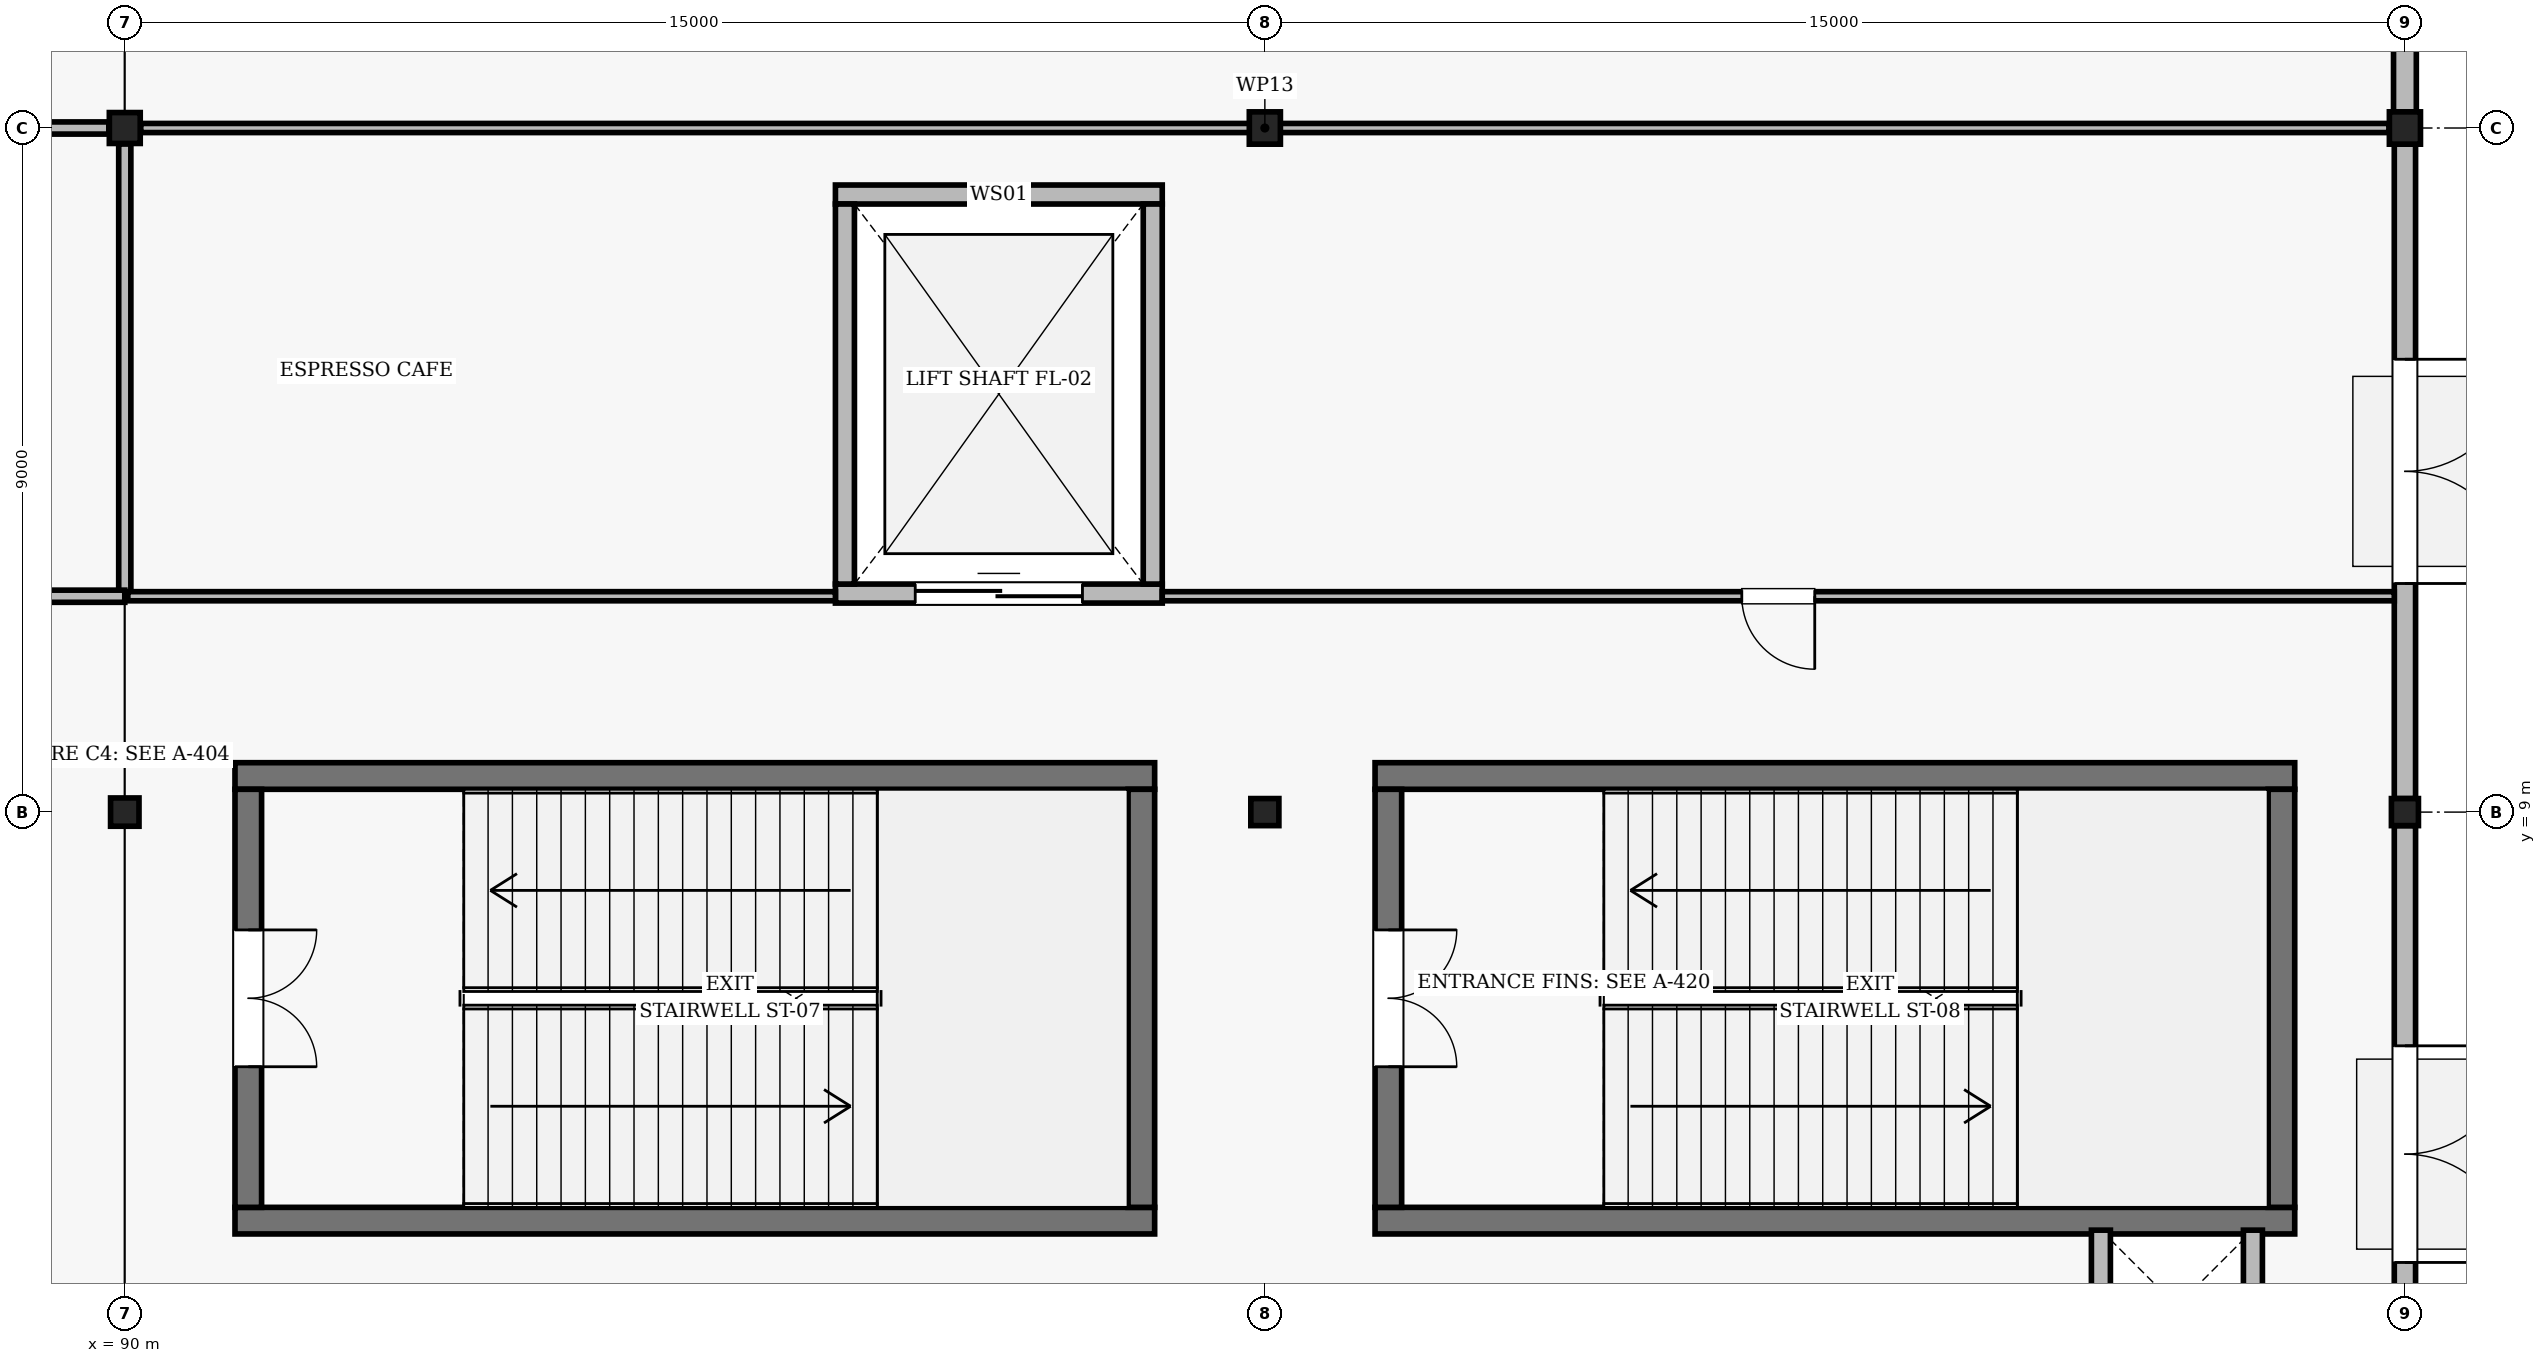
"""IFC4 building model, lengths in metres.
Left out: names, types, materials, properties, quantities, classifications, styles, units other than length and angle.
Written with IfcOpenShell. Run it as: python <this file> out.ifc"""

import sys

from ifc_helpers import new_model, si_unit, direction, frame, frame_2d, origin, origin_2d, place, context, subcontext, project, spatial, rectangle, hollow_circle, i_section, extrude, element, fill, save


model = new_model("IFC4")
c1 = context("Model", 3, precision=1e-05, world=origin(), true_north=direction((0.0, 1.0)))
c2 = subcontext(c1, "Body", "Model", "MODEL_VIEW")
j1 = project(units=[si_unit("LENGTHUNIT", "METRE"), si_unit("PLANEANGLEUNIT", "RADIAN")], contexts=[c1])
p1 = place(None, origin())
s1 = spatial("IfcSite", under=j1, at=p1, CompositionType="ELEMENT")
p2 = place(p1, origin())
s2 = spatial("IfcBuilding", under=s1, at=p2, CompositionType="ELEMENT")
p3 = place(p2, origin())
s3 = spatial("IfcBuildingStorey", under=s2, at=p3, CompositionType="ELEMENT", Elevation=0.0)
p4 = place(p3, frame((90.0, 9.0, 0.0), z_axis=(0.0, 0.0, 1.0), x_axis=(1.0, 0.0, 0.0)))
e1 = element("IfcColumn", 1, at=p4, inside=s3, PredefinedType="COLUMN", context=c2, shape_type="SweptSolid", body=[
    extrude(i_section(OverallWidth=0.374, OverallDepth=0.372, WebThickness=0.016, FlangeThickness=0.026, FilletRadius=0.016, at=origin_2d()), origin(), (0.0, 0.0, 1.0), 5.4),
])
p5 = place(p3, frame((90.0, 18.0, 0.0), z_axis=(0.0, 0.0, 1.0), x_axis=(1.0, 0.0, 0.0)))
e2 = element("IfcColumn", 2, at=p5, inside=s3, PredefinedType="COLUMN", context=c2, shape_type="SweptSolid", body=[
    extrude(hollow_circle(Radius=0.203, WallThickness=0.016, at=origin_2d()), origin(), (0.0, 0.0, 1.0), 5.4),
])
p6 = place(p3, frame((105.0, 9.0, 0.0), z_axis=(0.0, 0.0, 1.0), x_axis=(1.0, 0.0, 0.0)))
e3 = element("IfcColumn", 3, at=p6, inside=s3, PredefinedType="COLUMN", context=c2, shape_type="SweptSolid", body=[
    extrude(i_section(OverallWidth=0.369, OverallDepth=0.356, WebThickness=0.011, FlangeThickness=0.018, FilletRadius=0.015, at=origin_2d()), origin(), (0.0, 0.0, 1.0), 5.4),
])
p7 = place(p3, frame((105.0, 18.0, 0.0), z_axis=(0.0, 0.0, 1.0), x_axis=(1.0, 0.0, 0.0)))
e4 = element("IfcColumn", 4, at=p7, inside=s3, PredefinedType="COLUMN", context=c2, shape_type="SweptSolid", body=[
    extrude(i_section(OverallWidth=0.409, OverallDepth=0.425, WebThickness=0.031, FlangeThickness=0.049, FilletRadius=0.02, at=origin_2d()), origin(), (0.0, 0.0, 1.0), 5.4),
])
p8 = place(p3, frame((120.0, 9.0, 0.0), z_axis=(0.0, 0.0, 1.0), x_axis=(1.0, 0.0, 0.0)))
e5 = element("IfcColumn", 5, at=p8, inside=s3, PredefinedType="COLUMN", context=c2, shape_type="SweptSolid", body=[
    extrude(hollow_circle(Radius=0.178, WallThickness=0.016, at=origin_2d()), origin(), (0.0, 0.0, 1.0), 5.4),
])
p9 = place(p3, frame((120.0, 18.0, 0.0), z_axis=(0.0, 0.0, 1.0), x_axis=(1.0, 0.0, 0.0)))
e6 = element("IfcColumn", 6, at=p9, inside=s3, PredefinedType="COLUMN", context=c2, shape_type="SweptSolid", body=[
    extrude(i_section(OverallWidth=0.409, OverallDepth=0.425, WebThickness=0.031, FlangeThickness=0.049, FilletRadius=0.02, at=origin_2d()), origin(), (0.0, 0.0, 1.0), 5.4),
])
p10 = place(p3, frame((120.0, 8.822, 0.0), z_axis=(0.0, 0.0, 1.0), x_axis=(0.0, -1.0, 0.0)))
e7 = element("IfcWall", 7, at=p10, inside=s3, PredefinedType="SOLIDWALL", context=c2, shape_type="SweptSolid", body=[
    extrude(rectangle(XDim=8.644, YDim=0.28, at=frame_2d((4.322, 0.0))), origin(), (0.0, 0.0, 1.0), 4.699),
])
p11 = place(p10, frame((2.897, 0.0, 0.0)))
e8 = element("IfcOpeningElement", 8, at=p11, cuts=e7, PredefinedType="OPENING", context=c2, shape_type="SweptSolid", body=[
    extrude(rectangle(XDim=2.85, YDim=2.62, at=frame_2d((1.425, 1.31))), frame((0.0, 0.15, 0.0), z_axis=(0.0, -1.0, 0.0), x_axis=(1.0, 0.0, 0.0)), (0.0, 0.0, 1.0), 0.3),
])
p12 = place(p3, frame((120.0, 17.788, 0.0), z_axis=(0.0, 0.0, 1.0), x_axis=(0.0, -1.0, 0.0)))
e9 = element("IfcWall", 9, at=p12, inside=s3, PredefinedType="SOLIDWALL", context=c2, shape_type="SweptSolid", body=[
    extrude(rectangle(XDim=8.61, YDim=0.28, at=frame_2d((4.305, 0.0))), origin(), (0.0, 0.0, 1.0), 4.865),
])
p13 = place(p12, frame((2.83, 0.0, 0.0)))
e10 = element("IfcOpeningElement", 10, at=p13, cuts=e9, PredefinedType="OPENING", context=c2, shape_type="SweptSolid", body=[
    extrude(rectangle(XDim=2.95, YDim=2.68, at=frame_2d((1.475, 1.34))), frame((0.0, 0.15, 0.0), z_axis=(0.0, -1.0, 0.0), x_axis=(1.0, 0.0, 0.0)), (0.0, 0.0, 1.0), 0.3),
])
p14 = place(p3, frame((120.0, 26.525, 0.0), z_axis=(0.0, 0.0, 1.0), x_axis=(0.0, -1.0, 0.0)))
e11 = element("IfcWall", 11, at=p14, inside=s3, PredefinedType="SOLIDWALL", context=c2, shape_type="SweptSolid", body=[
    extrude(rectangle(XDim=8.312, YDim=0.3, at=frame_2d((4.156, 0.0))), origin(), (0.0, 0.0, 1.0), 4.846),
])
for number, where, z_axis, x_axis in (
    (12, (91.45, 3.625, 0.0), (0.0, 0.0, 1.0), (1.0, 0.0, 0.0)),
    (13, (103.55, 9.475, 0.0), (0.0, 0.0, 1.0), (-1.0, 0.0, 0.0)),
):
    element("IfcWall", number, at=place(p3, frame(where, z_axis=z_axis, x_axis=x_axis)), inside=s3, PredefinedType="SHEAR", context=c2, shape_type="SweptSolid", body=[
        extrude(rectangle(XDim=12.1, YDim=0.35, at=frame_2d((6.05, 0.0))), origin(), (0.0, 0.0, 1.0), 5.18),
    ])
p15 = place(p3, frame((91.625, 9.3, 0.0), z_axis=(0.0, 0.0, 1.0), x_axis=(0.0, -1.0, 0.0)))
e14 = element("IfcWall", 14, at=p15, inside=s3, PredefinedType="SHEAR", context=c2, shape_type="SweptSolid", body=[
    extrude(rectangle(XDim=5.5, YDim=0.35, at=frame_2d((2.75, 0.0))), origin(), (0.0, 0.0, 1.0), 5.18),
])
p16 = place(p15, frame((1.85, 0.0, 0.0)))
e15 = element("IfcOpeningElement", 15, at=p16, cuts=e14, PredefinedType="OPENING", context=c2, shape_type="SweptSolid", body=[
    extrude(rectangle(XDim=1.8, YDim=2.2, at=frame_2d((0.9, 1.1))), frame((0.0, 0.185, 0.0), z_axis=(0.0, -1.0, 0.0), x_axis=(1.0, 0.0, 0.0)), (0.0, 0.0, 1.0), 0.37),
])
p17 = place(p3, frame((103.375, 3.8, 0.0), z_axis=(0.0, 0.0, 1.0), x_axis=(0.0, 1.0, 0.0)))
e16 = element("IfcWall", 16, at=p17, inside=s3, PredefinedType="SHEAR", context=c2, shape_type="SweptSolid", body=[
    extrude(rectangle(XDim=5.5, YDim=0.35, at=frame_2d((2.75, 0.0))), origin(), (0.0, 0.0, 1.0), 5.18),
])
for number, where, z_axis, x_axis in (
    (17, (106.45, 3.625, 0.0), (0.0, 0.0, 1.0), (1.0, 0.0, 0.0)),
    (18, (118.55, 9.475, 0.0), (0.0, 0.0, 1.0), (-1.0, 0.0, 0.0)),
):
    element("IfcWall", number, at=place(p3, frame(where, z_axis=z_axis, x_axis=x_axis)), inside=s3, PredefinedType="SHEAR", context=c2, shape_type="SweptSolid", body=[
        extrude(rectangle(XDim=12.1, YDim=0.35, at=frame_2d((6.05, 0.0))), origin(), (0.0, 0.0, 1.0), 5.18),
    ])
p18 = place(p3, frame((106.625, 9.3, 0.0), z_axis=(0.0, 0.0, 1.0), x_axis=(0.0, -1.0, 0.0)))
e19 = element("IfcWall", 19, at=p18, inside=s3, PredefinedType="SHEAR", context=c2, shape_type="SweptSolid", body=[
    extrude(rectangle(XDim=5.5, YDim=0.35, at=frame_2d((2.75, 0.0))), origin(), (0.0, 0.0, 1.0), 5.18),
])
p19 = place(p18, frame((1.85, 0.0, 0.0)))
e20 = element("IfcOpeningElement", 20, at=p19, cuts=e19, PredefinedType="OPENING", context=c2, shape_type="SweptSolid", body=[
    extrude(rectangle(XDim=1.8, YDim=2.2, at=frame_2d((0.9, 1.1))), frame((0.0, 0.185, 0.0), z_axis=(0.0, -1.0, 0.0), x_axis=(1.0, 0.0, 0.0)), (0.0, 0.0, 1.0), 0.37),
])
p20 = place(p3, frame((118.375, 3.8, 0.0), z_axis=(0.0, 0.0, 1.0), x_axis=(0.0, 1.0, 0.0)))
e21 = element("IfcWall", 21, at=p20, inside=s3, PredefinedType="SHEAR", context=c2, shape_type="SweptSolid", body=[
    extrude(rectangle(XDim=5.5, YDim=0.35, at=frame_2d((2.75, 0.0))), origin(), (0.0, 0.0, 1.0), 5.18),
])
p21 = place(p3, frame((99.35, 11.875, 0.0), z_axis=(0.0, 0.0, 1.0), x_axis=(1.0, 0.0, 0.0)))
e22 = element("IfcWall", 22, at=p21, inside=s3, PredefinedType="SOLIDWALL", context=c2, shape_type="SweptSolid", body=[
    extrude(rectangle(XDim=4.3, YDim=0.25, at=frame_2d((2.15, 0.0))), origin(), (0.0, 0.0, 1.0), 5.18),
])
p22 = place(p21, frame((1.05, 0.0, 0.0)))
e23 = element("IfcOpeningElement", 23, at=p22, cuts=e22, PredefinedType="OPENING", context=c2, shape_type="SweptSolid", body=[
    extrude(rectangle(XDim=2.2, YDim=2.5, at=frame_2d((1.1, 1.25))), frame((0.0, 0.135, 0.0), z_axis=(0.0, -1.0, 0.0), x_axis=(1.0, 0.0, 0.0)), (0.0, 0.0, 1.0), 0.27),
])
p23 = place(p3, frame((103.65, 17.125, 0.0), z_axis=(0.0, 0.0, 1.0), x_axis=(-1.0, 0.0, 0.0)))
e24 = element("IfcWall", 24, at=p23, inside=s3, PredefinedType="SOLIDWALL", context=c2, shape_type="SweptSolid", body=[
    extrude(rectangle(XDim=4.3, YDim=0.25, at=frame_2d((2.15, 0.0))), origin(), (0.0, 0.0, 1.0), 5.18),
])
for number, where, z_axis, x_axis in (
    (25, (99.475, 17.0, 0.0), (0.0, 0.0, 1.0), (0.0, -1.0, 0.0)),
    (26, (103.525, 12.0, 0.0), (0.0, 0.0, 1.0), (0.0, 1.0, 0.0)),
):
    element("IfcWall", number, at=place(p3, frame(where, z_axis=z_axis, x_axis=x_axis)), inside=s3, PredefinedType="SOLIDWALL", context=c2, shape_type="SweptSolid", body=[
        extrude(rectangle(XDim=5.0, YDim=0.25, at=frame_2d((2.5, 0.0))), origin(), (0.0, 0.0, 1.0), 5.18),
    ])
p24 = place(p3, frame((60.48, 18.0, 0.0), z_axis=(0.0, 0.0, 1.0), x_axis=(1.0, 0.0, 0.0)))
e27 = element("IfcWall", 27, at=p24, inside=s3, PredefinedType="PARTITIONING", context=c2, shape_type="SweptSolid", body=[
    extrude(rectangle(XDim=29.31, YDim=0.16, at=frame_2d((14.655, 0.0))), origin(), (0.0, 0.0, 1.0), 4.481),
])
p25 = place(p3, frame((90.0, 17.79, 0.0), z_axis=(0.0, 0.0, 1.0), x_axis=(0.0, -1.0, 0.0)))
e28 = element("IfcWall", 28, at=p25, inside=s3, PredefinedType="PARTITIONING", context=c2, shape_type="SweptSolid", body=[
    extrude(rectangle(XDim=5.95, YDim=0.16, at=frame_2d((2.975, 0.0))), origin(), (0.0, 0.0, 1.0), 4.554),
])
p26 = place(p3, frame((90.0, 11.84, 0.0), z_axis=(0.0, 0.0, 1.0), x_axis=(-1.0, 0.0, 0.0)))
e29 = element("IfcWall", 29, at=p26, inside=s3, PredefinedType="PARTITIONING", context=c2, shape_type="SweptSolid", body=[
    extrude(rectangle(XDim=16.38, YDim=0.16, at=frame_2d((8.19, 0.0))), origin(), (0.0, 0.0, 1.0), 4.481),
])
p27 = place(p26, frame((7.065, 0.0, 0.0)))
e30 = element("IfcOpeningElement", 30, at=p27, cuts=e29, PredefinedType="OPENING", context=c2, shape_type="SweptSolid", body=[
    extrude(rectangle(XDim=2.25, YDim=2.4, at=frame_2d((1.125, 1.2))), frame((0.0, 0.09, 0.0), z_axis=(0.0, -1.0, 0.0), x_axis=(1.0, 0.0, 0.0)), (0.0, 0.0, 1.0), 0.18),
])
p28 = place(p3, frame((119.86, 11.84, 0.0), z_axis=(0.0, 0.0, 1.0), x_axis=(-1.0, 0.0, 0.0)))
e31 = element("IfcWall", 31, at=p28, inside=s3, PredefinedType="PARTITIONING", context=c2, shape_type="SweptSolid", body=[
    extrude(rectangle(XDim=16.21, YDim=0.12, at=frame_2d((8.105, 0.0))), origin(), (0.0, 0.0, 1.0), 4.392),
])
p29 = place(p28, frame((7.625, 0.0, 0.0)))
e32 = element("IfcOpeningElement", 32, at=p29, cuts=e31, PredefinedType="OPENING", context=c2, shape_type="SweptSolid", body=[
    extrude(rectangle(XDim=0.96, YDim=2.15, at=frame_2d((0.48, 1.075))), frame((0.0, 0.07, 0.0), z_axis=(0.0, -1.0, 0.0), x_axis=(1.0, 0.0, 0.0)), (0.0, 0.0, 1.0), 0.14),
])
p30 = place(p3, frame((99.35, 11.84, 0.0), z_axis=(0.0, 0.0, 1.0), x_axis=(-1.0, 0.0, 0.0)))
e33 = element("IfcWall", 33, at=p30, inside=s3, PredefinedType="PARTITIONING", context=c2, shape_type="SweptSolid", body=[
    extrude(rectangle(XDim=9.31, YDim=0.12, at=frame_2d((4.655, 0.0))), origin(), (0.0, 0.0, 1.0), 4.554),
])
p31 = place(p3, frame((90.21, 18.0, 0.0), z_axis=(0.0, 0.0, 1.0), x_axis=(1.0, 0.0, 0.0)))
e34 = element("IfcWall", 34, at=p31, inside=s3, PredefinedType="PARTITIONING", context=c2, shape_type="SweptSolid", body=[
    extrude(rectangle(XDim=29.58, YDim=0.12, at=frame_2d((14.79, 0.0))), origin(), (0.0, 0.0, 1.0), 4.392),
])
for number, where, z_axis, x_axis in (
    (35, (116.0, 3.5, 0.0), (0.0, 0.0, 1.0), (0.0, -1.0, 0.0)),
    (36, (118.0, 1.5, 0.0), (0.0, 0.0, 1.0), (0.0, 1.0, 0.0)),
):
    element("IfcWall", number, at=place(p3, frame(where, z_axis=z_axis, x_axis=x_axis)), inside=s3, PredefinedType="SOLIDWALL", context=c2, shape_type="SweptSolid", body=[
        extrude(rectangle(XDim=2.0, YDim=0.25, at=frame_2d((1.0, 0.0))), origin(), (0.0, 0.0, 1.0), 4.83),
    ])
p32 = place(p11, origin())
e37 = element("IfcDoor", 37, at=p32, inside=s3, OperationType="DOUBLE_DOOR_SINGLE_SWING", PredefinedType="DOOR", context=c2, shape_type="SweptSolid", body=[
    extrude(rectangle(XDim=2.85, YDim=2.62, at=frame_2d((1.425, 1.31))), frame((0.0, 0.025, 0.0), z_axis=(0.0, -1.0, 0.0), x_axis=(1.0, 0.0, 0.0)), (0.0, 0.0, 1.0), 0.05),
])
fill(e8, e37)
p33 = place(p13, origin())
e38 = element("IfcDoor", 38, at=p33, inside=s3, OperationType="DOUBLE_DOOR_SINGLE_SWING", PredefinedType="DOOR", context=c2, shape_type="SweptSolid", body=[
    extrude(rectangle(XDim=2.95, YDim=2.68, at=frame_2d((1.475, 1.34))), frame((0.0, 0.025, 0.0), z_axis=(0.0, -1.0, 0.0), x_axis=(1.0, 0.0, 0.0)), (0.0, 0.0, 1.0), 0.05),
])
fill(e10, e38)
p34 = place(p16, origin())
e39 = element("IfcDoor", 39, at=p34, inside=s3, OperationType="DOUBLE_DOOR_SINGLE_SWING", PredefinedType="DOOR", context=c2, shape_type="SweptSolid", body=[
    extrude(rectangle(XDim=1.8, YDim=2.2, at=frame_2d((0.9, 1.1))), frame((0.0, 0.025, 0.0), z_axis=(0.0, -1.0, 0.0), x_axis=(1.0, 0.0, 0.0)), (0.0, 0.0, 1.0), 0.05),
])
fill(e15, e39)
p35 = place(p19, origin())
e40 = element("IfcDoor", 40, at=p35, inside=s3, OperationType="DOUBLE_DOOR_SINGLE_SWING", PredefinedType="DOOR", context=c2, shape_type="SweptSolid", body=[
    extrude(rectangle(XDim=1.8, YDim=2.2, at=frame_2d((0.9, 1.1))), frame((0.0, 0.025, 0.0), z_axis=(0.0, -1.0, 0.0), x_axis=(1.0, 0.0, 0.0)), (0.0, 0.0, 1.0), 0.05),
])
fill(e20, e40)
p36 = place(p22, origin())
e41 = element("IfcDoor", 41, at=p36, inside=s3, OperationType="DOUBLE_DOOR_SLIDING", PredefinedType="DOOR", context=c2, shape_type="SweptSolid", body=[
    extrude(rectangle(XDim=2.2, YDim=2.5, at=frame_2d((1.1, 1.25))), frame((0.0, 0.025, 0.0), z_axis=(0.0, -1.0, 0.0), x_axis=(1.0, 0.0, 0.0)), (0.0, 0.0, 1.0), 0.05),
])
fill(e23, e41)
p37 = place(p29, origin())
e42 = element("IfcDoor", 42, at=p37, inside=s3, OperationType="SINGLE_SWING_LEFT", PredefinedType="DOOR", context=c2, shape_type="SweptSolid", body=[
    extrude(rectangle(XDim=0.96, YDim=2.15, at=frame_2d((0.48, 1.075))), frame((0.0, 0.025, 0.0), z_axis=(0.0, -1.0, 0.0), x_axis=(1.0, 0.0, 0.0)), (0.0, 0.0, 1.0), 0.05),
])
fill(e32, e42)
save(model, sys.argv[1])
